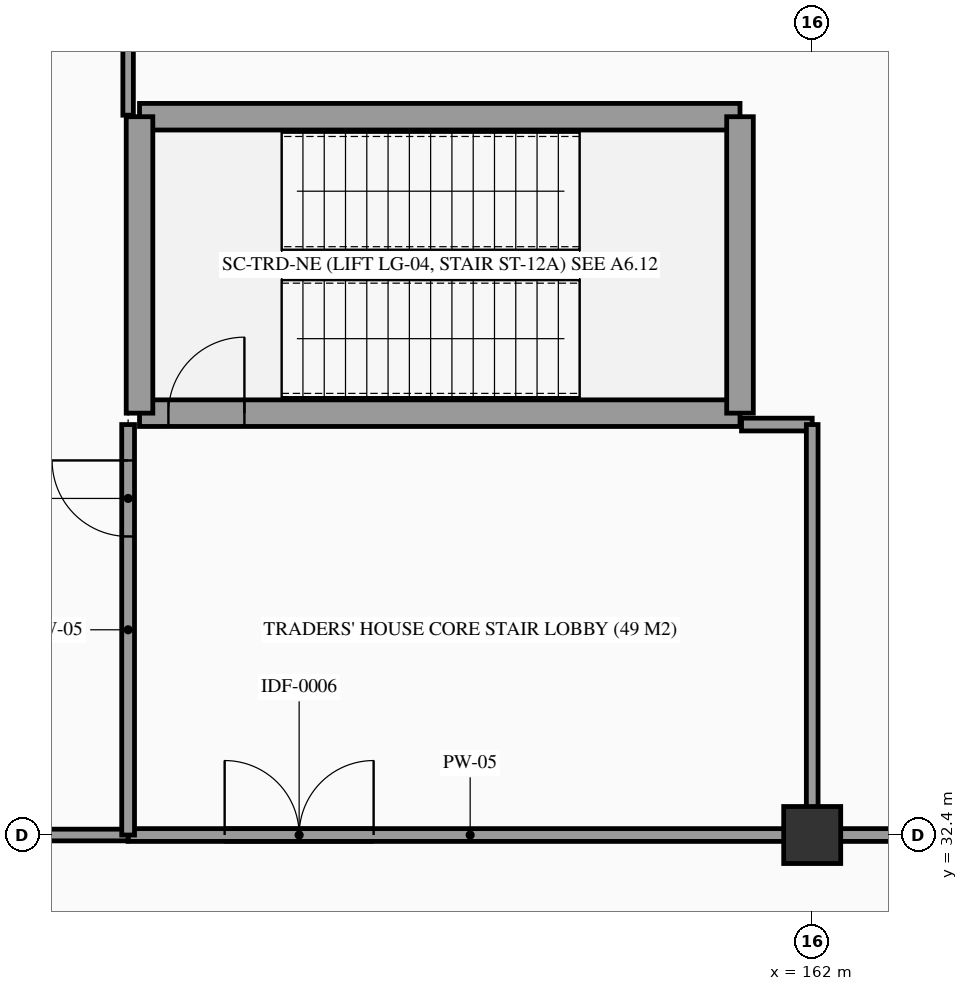
"""IFC4 building model, lengths in metres.
Left out: names, types, materials, properties, quantities, classifications, styles, units other than length and angle.
Written with IfcOpenShell. Run it as: python <this file> out.ifc"""

import sys

from ifc_helpers import new_model, si_unit, direction, frame, frame_2d, origin, origin_2d, place, context, subcontext, project, spatial, rectangle, extrude, element, fill, save


model = new_model("IFC4")
c1 = context("Model", 3, precision=1e-05, world=origin(), true_north=direction((0.0, 1.0)))
c2 = subcontext(c1, "Body", "Model", "MODEL_VIEW")
j1 = project(units=[si_unit("LENGTHUNIT", "METRE"), si_unit("PLANEANGLEUNIT", "RADIAN")], contexts=[c1])
p1 = place(None, origin())
s1 = spatial("IfcSite", under=j1, at=p1, CompositionType="ELEMENT")
p2 = place(p1, origin())
s2 = spatial("IfcBuilding", under=s1, at=p2, CompositionType="ELEMENT")
p3 = place(p2, origin())
s3 = spatial("IfcBuildingStorey", under=s2, at=p3, CompositionType="ELEMENT", Elevation=0.0)
p4 = place(p3, frame((162.0, 32.4, -1.2), z_axis=(0.0, 0.0, 1.0), x_axis=(1.0, 0.0, 0.0)))
e1 = element("IfcColumn", 1, at=p4, inside=s3, PredefinedType="COLUMN", context=c2, shape_type="SweptSolid", body=[
    extrude(rectangle(XDim=0.75, YDim=0.75, at=origin_2d()), origin(), (0.0, 0.0, 1.0), 6.6),
])
p5 = place(p3, frame((153.15, 37.95, 0.0), z_axis=(0.0, 0.0, 1.0), x_axis=(1.0, 0.0, 0.0)))
e2 = element("IfcWall", 2, at=p5, inside=s3, PredefinedType="SHEAR", context=c2, shape_type="SweptSolid", body=[
    extrude(rectangle(XDim=7.9, YDim=0.35, at=frame_2d((3.95, 0.0))), origin(), (0.0, 0.0, 1.0), 5.4),
])
p6 = place(p5, frame((0.38, 0.0, 0.0)))
e3 = element("IfcOpeningElement", 3, at=p6, cuts=e2, PredefinedType="OPENING", context=c2, shape_type="SweptSolid", body=[
    extrude(rectangle(XDim=1.0, YDim=2.15, at=frame_2d((0.5, 1.075))), frame((0.0, 0.185, 0.0), z_axis=(0.0, -1.0, 0.0), x_axis=(1.0, 0.0, 0.0)), (0.0, 0.0, 1.0), 0.37),
])
p7 = place(p3, frame((153.15, 41.85, 0.0), z_axis=(0.0, 0.0, 1.0), x_axis=(1.0, 0.0, 0.0)))
e4 = element("IfcWall", 4, at=p7, inside=s3, PredefinedType="SHEAR", context=c2, shape_type="SweptSolid", body=[
    extrude(rectangle(XDim=7.9, YDim=0.35, at=frame_2d((3.95, 0.0))), origin(), (0.0, 0.0, 1.0), 5.4),
])
for number, where, z_axis, x_axis in (
    (5, (153.15, 37.95, 0.0), (0.0, 0.0, 1.0), (0.0, 1.0, 0.0)),
    (6, (161.05, 37.95, 0.0), (0.0, 0.0, 1.0), (0.0, 1.0, 0.0)),
):
    element("IfcWall", number, at=place(p3, frame(where, z_axis=z_axis, x_axis=x_axis)), inside=s3, PredefinedType="SHEAR", context=c2, shape_type="SweptSolid", body=[
        extrude(rectangle(XDim=3.9, YDim=0.35, at=frame_2d((1.95, 0.0))), origin(), (0.0, 0.0, 1.0), 5.4),
    ])
p8 = place(p3, frame((153.0, 32.4, 0.0), z_axis=(0.0, 0.0, 1.0), x_axis=(1.0, 0.0, 0.0)))
e7 = element("IfcWall", 7, at=p8, inside=s3, PredefinedType="PARTITIONING", context=c2, shape_type="SweptSolid", body=[
    extrude(rectangle(XDim=9.0, YDim=0.168, at=frame_2d((4.5, 0.0))), origin(), (0.0, 0.0, 1.0), 3.95),
])
p9 = place(p8, frame((1.27, 0.0, 0.0)))
e8 = element("IfcOpeningElement", 8, at=p9, cuts=e7, PredefinedType="OPENING", context=c2, shape_type="SweptSolid", body=[
    extrude(rectangle(XDim=1.96, YDim=2.3, at=frame_2d((0.98, 1.15))), frame((0.0, 0.094, 0.0), z_axis=(0.0, -1.0, 0.0), x_axis=(1.0, 0.0, 0.0)), (0.0, 0.0, 1.0), 0.188),
])
p10 = place(p3, frame((129.6, 32.4, 0.0), z_axis=(0.0, 0.0, 1.0), x_axis=(1.0, 0.0, 0.0)))
e9 = element("IfcWall", 9, at=p10, inside=s3, PredefinedType="PARTITIONING", context=c2, shape_type="SweptSolid", body=[
    extrude(rectangle(XDim=23.4, YDim=0.154, at=frame_2d((11.7, 0.0))), origin(), (0.0, 0.0, 1.0), 3.95),
])
p11 = place(p10, frame((18.638, 0.0, 0.0)))
e10 = element("IfcOpeningElement", 10, at=p11, cuts=e9, PredefinedType="OPENING", context=c2, shape_type="SweptSolid", body=[
    extrude(rectangle(XDim=1.1, YDim=2.2, at=frame_2d((0.55, 1.1))), frame((0.0, 0.087, 0.0), z_axis=(0.0, -1.0, 0.0), x_axis=(1.0, 0.0, 0.0)), (0.0, 0.0, 1.0), 0.174),
])
p12 = place(p3, frame((153.0, 32.4, 0.0), z_axis=(0.0, 0.0, 1.0), x_axis=(0.0, 1.0, 0.0)))
e11 = element("IfcWall", 11, at=p12, inside=s3, PredefinedType="PARTITIONING", context=c2, shape_type="SweptSolid", body=[
    extrude(rectangle(XDim=5.4, YDim=0.168, at=frame_2d((2.7, 0.0))), origin(), (0.0, 0.0, 1.0), 3.95),
])
p13 = place(p12, frame((3.928, 0.0, 0.0)))
e12 = element("IfcOpeningElement", 12, at=p13, cuts=e11, PredefinedType="OPENING", context=c2, shape_type="SweptSolid", body=[
    extrude(rectangle(XDim=1.0, YDim=2.15, at=frame_2d((0.5, 1.075))), frame((0.0, 0.094, 0.0), z_axis=(0.0, -1.0, 0.0), x_axis=(1.0, 0.0, 0.0)), (0.0, 0.0, 1.0), 0.188),
])
p14 = place(p3, frame((161.07, 37.8, 0.0), z_axis=(0.0, 0.0, 1.0), x_axis=(1.0, 0.0, 0.0)))
e13 = element("IfcWall", 13, at=p14, inside=s3, PredefinedType="PARTITIONING", context=c2, shape_type="SweptSolid", body=[
    extrude(rectangle(XDim=0.93, YDim=0.168, at=frame_2d((0.465, 0.0))), origin(), (0.0, 0.0, 1.0), 3.95),
])
p15 = place(p3, frame((153.0, 41.87, 0.0), z_axis=(0.0, 0.0, 1.0), x_axis=(0.0, 1.0, 0.0)))
e14 = element("IfcWall", 14, at=p15, inside=s3, PredefinedType="PARTITIONING", context=c2, shape_type="SweptSolid", body=[
    extrude(rectangle(XDim=1.33, YDim=0.138, at=frame_2d((0.665, 0.0))), origin(), (0.0, 0.0, 1.0), 3.95),
])
p16 = place(p3, frame((162.0, 32.4, 0.0), z_axis=(0.0, 0.0, 1.0), x_axis=(1.0, 0.0, 0.0)))
e15 = element("IfcWall", 15, at=p16, inside=s3, PredefinedType="PARTITIONING", context=c2, shape_type="SweptSolid", body=[
    extrude(rectangle(XDim=10.8, YDim=0.168, at=frame_2d((5.4, 0.0))), origin(), (0.0, 0.0, 1.0), 3.95),
])
p17 = place(p3, frame((162.0, 32.4, 0.0), z_axis=(0.0, 0.0, 1.0), x_axis=(0.0, 1.0, 0.0)))
e16 = element("IfcWall", 16, at=p17, inside=s3, PredefinedType="PARTITIONING", context=c2, shape_type="SweptSolid", body=[
    extrude(rectangle(XDim=5.4, YDim=0.154, at=frame_2d((2.7, 0.0))), origin(), (0.0, 0.0, 1.0), 3.95),
])
p18 = place(p6, origin())
e17 = element("IfcDoor", 17, at=p18, inside=s3, OperationType="SINGLE_SWING_RIGHT", PredefinedType="DOOR", context=c2, shape_type="SweptSolid", body=[
    extrude(rectangle(XDim=1.0, YDim=2.15, at=frame_2d((0.5, 1.075))), frame((0.0, 0.025, 0.0), z_axis=(0.0, -1.0, 0.0), x_axis=(1.0, 0.0, 0.0)), (0.0, 0.0, 1.0), 0.05),
])
fill(e3, e17)
p19 = place(p9, frame((1.96, 0.0, 0.0), z_axis=(0.0, 0.0, 1.0), x_axis=(-1.0, 0.0, 0.0)))
e18 = element("IfcDoor", 18, at=p19, inside=s3, OperationType="DOUBLE_DOOR_SINGLE_SWING", PredefinedType="DOOR", context=c2, shape_type="SweptSolid", body=[
    extrude(rectangle(XDim=1.96, YDim=2.3, at=frame_2d((0.98, 1.15))), frame((0.0, 0.025, 0.0), z_axis=(0.0, -1.0, 0.0), x_axis=(1.0, 0.0, 0.0)), (0.0, 0.0, 1.0), 0.05),
])
fill(e8, e18)
p20 = place(p13, origin())
e19 = element("IfcDoor", 19, at=p20, inside=s3, OperationType="SINGLE_SWING_RIGHT", PredefinedType="DOOR", context=c2, shape_type="SweptSolid", body=[
    extrude(rectangle(XDim=1.0, YDim=2.15, at=frame_2d((0.5, 1.075))), frame((0.0, 0.025, 0.0), z_axis=(0.0, -1.0, 0.0), x_axis=(1.0, 0.0, 0.0)), (0.0, 0.0, 1.0), 0.05),
])
fill(e12, e19)
save(model, sys.argv[1])
